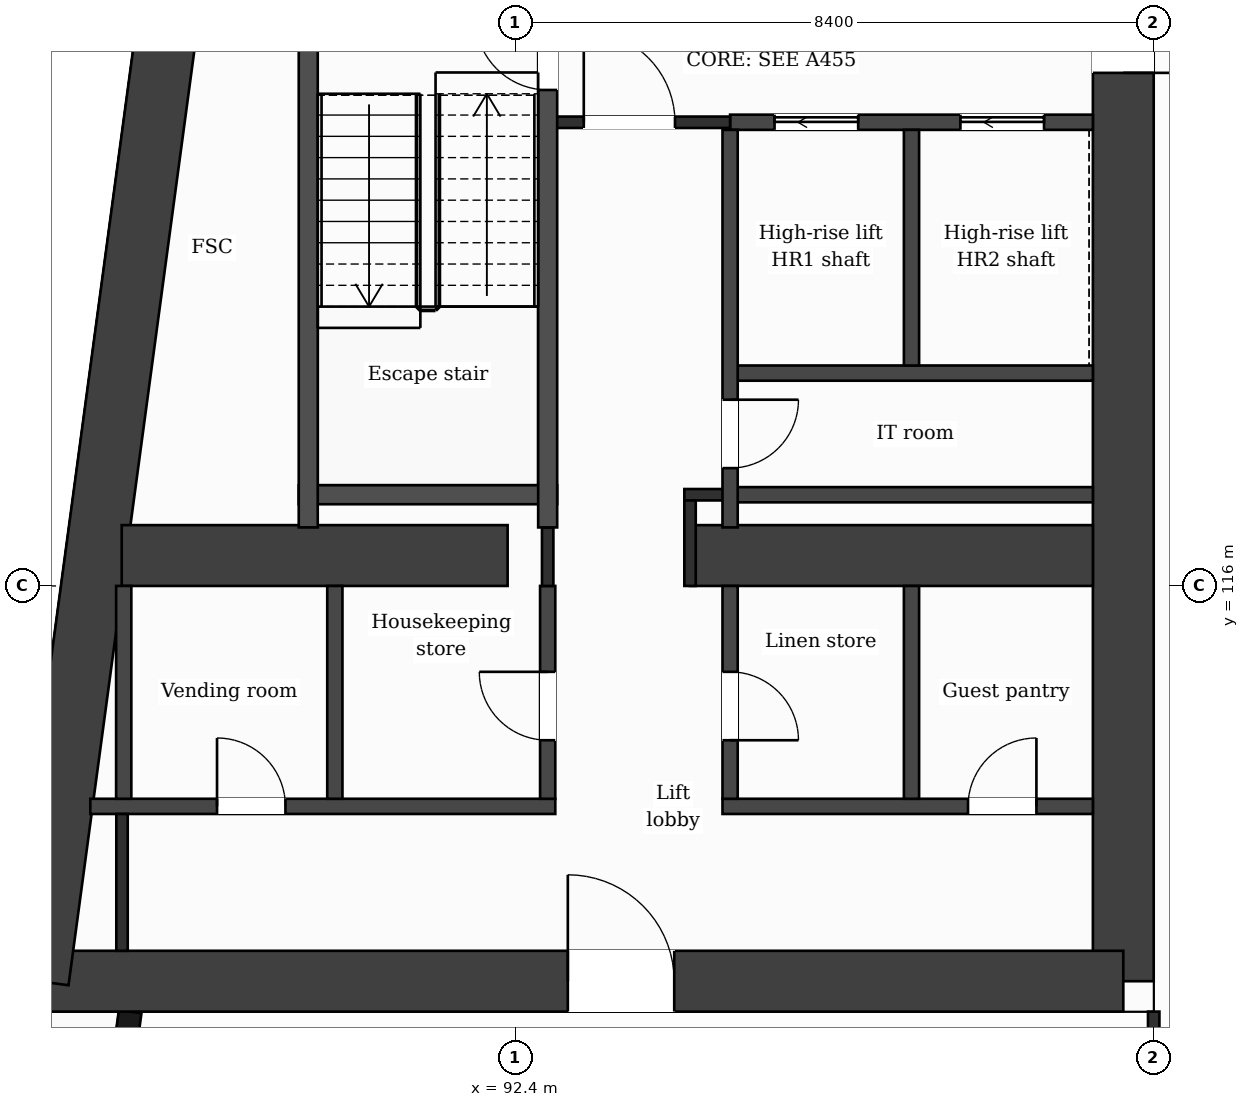
"""IFC4 building model, lengths in metres.
Left out: names, types, materials, properties, quantities, classifications, styles, units other than length and angle.
Written with IfcOpenShell. Run it as: python <this file> out.ifc"""

import sys

from ifc_helpers import new_model, si_unit, direction, frame, frame_2d, origin, place, context, subcontext, project, spatial, rectangle, extrude, element, fill, save


model = new_model("IFC4")
c1 = context("Model", 3, precision=1e-05, world=origin(), true_north=direction((0.0, 1.0)))
c2 = subcontext(c1, "Body", "Model", "MODEL_VIEW")
j1 = project(units=[si_unit("LENGTHUNIT", "METRE"), si_unit("PLANEANGLEUNIT", "RADIAN")], contexts=[c1])
p1 = place(None, origin())
s1 = spatial("IfcSite", under=j1, at=p1, CompositionType="ELEMENT")
p2 = place(p1, origin())
s2 = spatial("IfcBuilding", under=s1, at=p2, CompositionType="ELEMENT")
p3 = place(p2, frame((0.0, 0.0, 224.4)))
s3 = spatial("IfcBuildingStorey", under=s2, at=p3, CompositionType="ELEMENT", Elevation=224.4)
p4 = place(p3, frame((100.4, 132.0, 0.0), z_axis=(0.0, 0.0, 1.0), x_axis=(0.0, -1.0, 0.0)))
e1 = element("IfcWall", 1, at=p4, inside=s3, PredefinedType="SHEAR", context=c2, shape_type="SweptSolid", body=[
    extrude(rectangle(XDim=21.2, YDim=0.8, at=frame_2d((10.6, 0.0))), origin(), (0.0, 0.0, 1.0), 3.7),
])
p5 = place(p4, frame((7.85, 0.0, 0.0)))
e2 = element("IfcOpeningElement", 2, at=p5, cuts=e1, PredefinedType="OPENING", context=c2, shape_type="SweptSolid", body=[
    extrude(rectangle(XDim=1.4, YDim=2.1, at=frame_2d((0.7, 1.05))), frame((0.0, 0.41, 0.0), z_axis=(0.0, -1.0, 0.0), x_axis=(1.0, 0.0, 0.0)), (0.0, 0.0, 1.0), 0.82),
])
p6 = place(p3, frame((100.4, 110.8, 0.0), z_axis=(0.0, 0.0, 1.0), x_axis=(-1.0, 0.0, 0.0)))
e3 = element("IfcWall", 3, at=p6, inside=s3, PredefinedType="SHEAR", context=c2, shape_type="SweptSolid", body=[
    extrude(rectangle(XDim=14.273, YDim=0.8, at=frame_2d((7.137, 0.0))), origin(), (0.0, 0.0, 1.0), 3.7),
])
p7 = place(p6, frame((5.908, 0.0, 0.0)))
e4 = element("IfcOpeningElement", 4, at=p7, cuts=e3, PredefinedType="OPENING", context=c2, shape_type="SweptSolid", body=[
    extrude(rectangle(XDim=1.4, YDim=2.1, at=frame_2d((0.7, 1.05))), frame((0.0, 0.41, 0.0), z_axis=(0.0, -1.0, 0.0), x_axis=(1.0, 0.0, 0.0)), (0.0, 0.0, 1.0), 0.82),
])
p8 = place(p3, frame((86.127, 110.8, 0.0), z_axis=(0.0, 0.0, 1.0), x_axis=(0.133408347329, 0.991061154956, 0.0)))
e5 = element("IfcWall", 5, at=p8, inside=s3, PredefinedType="SHEAR", context=c2, shape_type="SweptSolid", body=[
    extrude(rectangle(XDim=21.391, YDim=0.8, at=frame_2d((10.696, 0.0))), origin(), (0.0, 0.0, 1.0), 3.7),
])
p9 = place(p3, frame((87.223, 116.4, 0.0), z_axis=(0.0, 0.0, 1.0), x_axis=(1.0, 0.0, 0.0)))
e6 = element("IfcWall", 6, at=p9, inside=s3, PredefinedType="SHEAR", context=c2, shape_type="SweptSolid", body=[
    extrude(rectangle(XDim=5.077, YDim=0.8, at=frame_2d((2.539, 0.0))), origin(), (0.0, 0.0, 1.0), 3.7),
])
p10 = place(p3, frame((94.7, 116.4, 0.0), z_axis=(0.0, 0.0, 1.0), x_axis=(1.0, 0.0, 0.0)))
e7 = element("IfcWall", 7, at=p10, inside=s3, PredefinedType="SHEAR", context=c2, shape_type="SweptSolid", body=[
    extrude(rectangle(XDim=5.3, YDim=0.8, at=frame_2d((2.65, 0.0))), origin(), (0.0, 0.0, 1.0), 3.7),
])
p11 = place(p3, frame((87.334, 110.4, 0.0), z_axis=(0.0, 0.0, 1.0), x_axis=(-0.133437175554, -0.991057273915, 0.0)))
e8 = element("IfcWall", 8, at=p11, inside=s3, PredefinedType="SOLIDWALL", context=c2, shape_type="SweptSolid", body=[
    extrude(rectangle(XDim=6.781, YDim=0.3, at=frame_2d((3.39, 0.0))), origin(), (0.0, 0.0, 1.0), 3.38),
])
p12 = place(p11, frame((1.418, 0.0, 0.0)))
e9 = element("IfcOpeningElement", 9, at=p12, cuts=e8, PredefinedType="OPENING", context=c2, shape_type="SweptSolid", body=[
    extrude(rectangle(XDim=1.2, YDim=2.4, at=frame_2d((0.6, 1.2))), frame((0.0, 0.16, 0.0), z_axis=(0.0, -1.0, 0.0), x_axis=(1.0, 0.0, 0.0)), (0.0, 0.0, 1.0), 0.32),
])
p13 = place(p11, frame((4.758, 0.0, 0.9)))
e10 = element("IfcOpeningElement", 10, at=p13, cuts=e8, PredefinedType="OPENING", context=c2, shape_type="SweptSolid", body=[
    extrude(rectangle(XDim=1.2, YDim=2.1, at=frame_2d((0.6, 1.05))), frame((0.0, 0.16, 0.0), z_axis=(0.0, -1.0, 0.0), x_axis=(1.0, 0.0, 0.0)), (0.0, 0.0, 1.0), 0.32),
])
p14 = place(p3, frame((86.81, 113.1, 0.0), z_axis=(0.0, 0.0, 1.0), x_axis=(1.0, 0.0, 0.0)))
e11 = element("IfcWall", 11, at=p14, inside=s3, PredefinedType="PARTITIONING", context=c2, shape_type="SweptSolid", body=[
    extrude(rectangle(XDim=6.117, YDim=0.2, at=frame_2d((3.059, 0.0))), origin(), (0.0, 0.0, 1.0), 3.38),
])
p15 = place(p14, frame((1.667, 0.0, 0.0)))
e12 = element("IfcOpeningElement", 12, at=p15, cuts=e11, PredefinedType="OPENING", context=c2, shape_type="SweptSolid", body=[
    extrude(rectangle(XDim=0.9, YDim=2.1, at=frame_2d((0.45, 1.05))), frame((0.0, 0.11, 0.0), z_axis=(0.0, -1.0, 0.0), x_axis=(1.0, 0.0, 0.0)), (0.0, 0.0, 1.0), 0.22),
])
p16 = place(p3, frame((95.127, 113.1, 0.0), z_axis=(0.0, 0.0, 1.0), x_axis=(1.0, 0.0, 0.0)))
e13 = element("IfcWall", 13, at=p16, inside=s3, PredefinedType="PARTITIONING", context=c2, shape_type="SweptSolid", body=[
    extrude(rectangle(XDim=4.873, YDim=0.2, at=frame_2d((2.437, 0.0))), origin(), (0.0, 0.0, 1.0), 3.38),
])
p17 = place(p16, frame((3.23, 0.0, 0.0)))
e14 = element("IfcOpeningElement", 14, at=p17, cuts=e13, PredefinedType="OPENING", context=c2, shape_type="SweptSolid", body=[
    extrude(rectangle(XDim=0.9, YDim=2.1, at=frame_2d((0.45, 1.05))), frame((0.0, 0.11, 0.0), z_axis=(0.0, -1.0, 0.0), x_axis=(1.0, 0.0, 0.0)), (0.0, 0.0, 1.0), 0.22),
])
p18 = place(p3, frame((95.227, 117.2, 0.0), z_axis=(0.0, 0.0, 1.0), x_axis=(1.0, 0.0, 0.0)))
e15 = element("IfcWall", 15, at=p18, inside=s3, PredefinedType="PARTITIONING", context=c2, shape_type="SweptSolid", body=[
    extrude(rectangle(XDim=4.773, YDim=0.2, at=frame_2d((2.386, 0.0))), origin(), (0.0, 0.0, 1.0), 3.38),
])
p19 = place(p3, frame((94.625, 117.2, 0.0), z_axis=(0.0, 0.0, 1.0), x_axis=(1.0, 0.0, 0.0)))
e16 = element("IfcWall", 16, at=p19, inside=s3, PredefinedType="PARTITIONING", context=c2, shape_type="SweptSolid", body=[
    extrude(rectangle(XDim=0.602, YDim=0.15, at=frame_2d((0.301, 0.0))), origin(), (0.0, 0.0, 1.0), 3.38),
])
p20 = place(p3, frame((89.552, 117.2, 0.0), z_axis=(0.0, 0.0, 1.0), x_axis=(1.0, 0.0, 0.0)))
e17 = element("IfcWall", 17, at=p20, inside=s3, PredefinedType="PARTITIONING", context=c2, shape_type="SweptSolid", body=[
    extrude(rectangle(XDim=3.4, YDim=0.25, at=frame_2d((1.7, 0.0))), origin(), (0.0, 0.0, 1.0), 3.38),
])
p21 = place(p3, frame((95.227, 118.8, 0.0), z_axis=(0.0, 0.0, 1.0), x_axis=(1.0, 0.0, 0.0)))
e18 = element("IfcWall", 18, at=p21, inside=s3, PredefinedType="PARTITIONING", context=c2, shape_type="SweptSolid", body=[
    extrude(rectangle(XDim=4.773, YDim=0.2, at=frame_2d((2.386, 0.0))), origin(), (0.0, 0.0, 1.0), 3.38),
])
p22 = place(p3, frame((95.227, 122.1, 0.0), z_axis=(0.0, 0.0, 1.0), x_axis=(1.0, 0.0, 0.0)))
e19 = element("IfcWall", 19, at=p22, inside=s3, PredefinedType="PARTITIONING", context=c2, shape_type="SweptSolid", body=[
    extrude(rectangle(XDim=4.773, YDim=0.2, at=frame_2d((2.386, 0.0))), origin(), (0.0, 0.0, 1.0), 3.38),
])
p23 = place(p22, frame((0.585, 0.0, 0.0)))
e20 = element("IfcOpeningElement", 20, at=p23, cuts=e19, PredefinedType="OPENING", context=c2, shape_type="SweptSolid", body=[
    extrude(rectangle(XDim=1.1, YDim=2.1, at=frame_2d((0.55, 1.05))), frame((0.0, 0.11, 0.0), z_axis=(0.0, -1.0, 0.0), x_axis=(1.0, 0.0, 0.0)), (0.0, 0.0, 1.0), 0.22),
])
p24 = place(p22, frame((3.03, 0.0, 0.0)))
e21 = element("IfcOpeningElement", 21, at=p24, cuts=e19, PredefinedType="OPENING", context=c2, shape_type="SweptSolid", body=[
    extrude(rectangle(XDim=1.1, YDim=2.1, at=frame_2d((0.55, 1.05))), frame((0.0, 0.11, 0.0), z_axis=(0.0, -1.0, 0.0), x_axis=(1.0, 0.0, 0.0)), (0.0, 0.0, 1.0), 0.22),
])
p25 = place(p3, frame((92.827, 122.1, 0.0), z_axis=(0.0, 0.0, 1.0), x_axis=(1.0, 0.0, 0.0)))
e22 = element("IfcWall", 22, at=p25, inside=s3, PredefinedType="PARTITIONING", context=c2, shape_type="SweptSolid", body=[
    extrude(rectangle(XDim=2.4, YDim=0.15, at=frame_2d((1.2, 0.0))), origin(), (0.0, 0.0, 1.0), 3.38),
])
p26 = place(p25, frame((0.475, 0.0, 0.0)))
e23 = element("IfcOpeningElement", 23, at=p26, cuts=e22, PredefinedType="OPENING", context=c2, shape_type="SweptSolid", body=[
    extrude(rectangle(XDim=1.2, YDim=2.1, at=frame_2d((0.6, 1.05))), frame((0.0, 0.085, 0.0), z_axis=(0.0, -1.0, 0.0), x_axis=(1.0, 0.0, 0.0)), (0.0, 0.0, 1.0), 0.17),
])
p27 = place(p3, frame((87.25, 113.2, 0.0), z_axis=(0.0, 0.0, 1.0), x_axis=(0.0, 1.0, 0.0)))
e24 = element("IfcWall", 24, at=p27, inside=s3, PredefinedType="PARTITIONING", context=c2, shape_type="SweptSolid", body=[
    extrude(rectangle(XDim=2.8, YDim=0.2, at=frame_2d((1.4, 0.0))), origin(), (0.0, 0.0, 1.0), 3.38),
])
p28 = place(p3, frame((87.227, 111.2, 0.0), z_axis=(0.0, 0.0, 1.0), x_axis=(0.0, 1.0, 0.0)))
e25 = element("IfcWall", 25, at=p28, inside=s3, PredefinedType="PARTITIONING", context=c2, shape_type="SweptSolid", body=[
    extrude(rectangle(XDim=1.8, YDim=0.15, at=frame_2d((0.9, 0.0))), origin(), (0.0, 0.0, 1.0), 3.38),
])
p29 = place(p3, frame((89.677, 116.77, 0.0), z_axis=(0.0, 0.0, 1.0), x_axis=(0.0, 1.0, 0.0)))
e26 = element("IfcWall", 26, at=p29, inside=s3, PredefinedType="PARTITIONING", context=c2, shape_type="SweptSolid", body=[
    extrude(rectangle(XDim=7.055, YDim=0.25, at=frame_2d((3.527, 0.0))), origin(), (0.0, 0.0, 1.0), 3.38),
])
p30 = place(p3, frame((90.027, 113.2, 0.0), z_axis=(0.0, 0.0, 1.0), x_axis=(0.0, 1.0, 0.0)))
e27 = element("IfcWall", 27, at=p30, inside=s3, PredefinedType="PARTITIONING", context=c2, shape_type="SweptSolid", body=[
    extrude(rectangle(XDim=2.8, YDim=0.2, at=frame_2d((1.4, 0.0))), origin(), (0.0, 0.0, 1.0), 3.38),
])
p31 = place(p3, frame((92.827, 113.2, 0.0), z_axis=(0.0, 0.0, 1.0), x_axis=(0.0, 1.0, 0.0)))
e28 = element("IfcWall", 28, at=p31, inside=s3, PredefinedType="PARTITIONING", context=c2, shape_type="SweptSolid", body=[
    extrude(rectangle(XDim=2.8, YDim=0.2, at=frame_2d((1.4, 0.0))), origin(), (0.0, 0.0, 1.0), 3.38),
])
p32 = place(p31, frame((0.77, 0.0, 0.0)))
e29 = element("IfcOpeningElement", 29, at=p32, cuts=e28, PredefinedType="OPENING", context=c2, shape_type="SweptSolid", body=[
    extrude(rectangle(XDim=0.9, YDim=2.1, at=frame_2d((0.45, 1.05))), frame((0.0, 0.11, 0.0), z_axis=(0.0, -1.0, 0.0), x_axis=(1.0, 0.0, 0.0)), (0.0, 0.0, 1.0), 0.22),
])
p33 = place(p3, frame((92.827, 116.0, 0.0), z_axis=(0.0, 0.0, 1.0), x_axis=(0.0, 1.0, 0.0)))
e30 = element("IfcWall", 30, at=p33, inside=s3, PredefinedType="PARTITIONING", context=c2, shape_type="SweptSolid", body=[
    extrude(rectangle(XDim=0.77, YDim=0.15, at=frame_2d((0.385, 0.0))), origin(), (0.0, 0.0, 1.0), 3.38),
])
p34 = place(p3, frame((92.827, 116.77, 0.0), z_axis=(0.0, 0.0, 1.0), x_axis=(0.0, 1.0, 0.0)))
e31 = element("IfcWall", 31, at=p34, inside=s3, PredefinedType="PARTITIONING", context=c2, shape_type="SweptSolid", body=[
    extrude(rectangle(XDim=7.055, YDim=0.25, at=frame_2d((3.527, 0.0))), origin(), (0.0, 0.0, 1.0), 3.38),
])
p35 = place(p34, frame((5.755, 0.0, 0.0)))
e32 = element("IfcOpeningElement", 32, at=p35, cuts=e31, PredefinedType="OPENING", context=c2, shape_type="SweptSolid", body=[
    extrude(rectangle(XDim=0.95, YDim=2.1, at=frame_2d((0.475, 1.05))), frame((0.0, 0.135, 0.0), z_axis=(0.0, -1.0, 0.0), x_axis=(1.0, 0.0, 0.0)), (0.0, 0.0, 1.0), 0.27),
])
p36 = place(p3, frame((94.7, 116.0, 0.0), z_axis=(0.0, 0.0, 1.0), x_axis=(0.0, 1.0, 0.0)))
e33 = element("IfcWall", 33, at=p36, inside=s3, PredefinedType="PARTITIONING", context=c2, shape_type="SweptSolid", body=[
    extrude(rectangle(XDim=1.125, YDim=0.15, at=frame_2d((0.562, 0.0))), origin(), (0.0, 0.0, 1.0), 3.38),
])
p37 = place(p3, frame((95.227, 113.2, 0.0), z_axis=(0.0, 0.0, 1.0), x_axis=(0.0, 1.0, 0.0)))
e34 = element("IfcWall", 34, at=p37, inside=s3, PredefinedType="PARTITIONING", context=c2, shape_type="SweptSolid", body=[
    extrude(rectangle(XDim=2.8, YDim=0.2, at=frame_2d((1.4, 0.0))), origin(), (0.0, 0.0, 1.0), 3.38),
])
p38 = place(p37, frame((0.77, 0.0, 0.0)))
e35 = element("IfcOpeningElement", 35, at=p38, cuts=e34, PredefinedType="OPENING", context=c2, shape_type="SweptSolid", body=[
    extrude(rectangle(XDim=0.9, YDim=2.1, at=frame_2d((0.45, 1.05))), frame((0.0, 0.11, 0.0), z_axis=(0.0, -1.0, 0.0), x_axis=(1.0, 0.0, 0.0)), (0.0, 0.0, 1.0), 0.22),
])
p39 = place(p3, frame((95.227, 116.77, 0.0), z_axis=(0.0, 0.0, 1.0), x_axis=(0.0, 1.0, 0.0)))
e36 = element("IfcWall", 36, at=p39, inside=s3, PredefinedType="PARTITIONING", context=c2, shape_type="SweptSolid", body=[
    extrude(rectangle(XDim=5.23, YDim=0.2, at=frame_2d((2.615, 0.0))), origin(), (0.0, 0.0, 1.0), 3.38),
])
p40 = place(p39, frame((0.78, 0.0, 0.0)))
e37 = element("IfcOpeningElement", 37, at=p40, cuts=e36, PredefinedType="OPENING", context=c2, shape_type="SweptSolid", body=[
    extrude(rectangle(XDim=0.9, YDim=2.1, at=frame_2d((0.45, 1.05))), frame((0.0, 0.11, 0.0), z_axis=(0.0, -1.0, 0.0), x_axis=(1.0, 0.0, 0.0)), (0.0, 0.0, 1.0), 0.22),
])
p41 = place(p3, frame((97.614, 113.2, 0.0), z_axis=(0.0, 0.0, 1.0), x_axis=(0.0, 1.0, 0.0)))
e38 = element("IfcWall", 38, at=p41, inside=s3, PredefinedType="PARTITIONING", context=c2, shape_type="SweptSolid", body=[
    extrude(rectangle(XDim=2.8, YDim=0.2, at=frame_2d((1.4, 0.0))), origin(), (0.0, 0.0, 1.0), 3.38),
])
p42 = place(p3, frame((97.614, 118.9, 0.0), z_axis=(0.0, 0.0, 1.0), x_axis=(0.0, 1.0, 0.0)))
e39 = element("IfcWall", 39, at=p42, inside=s3, PredefinedType="PARTITIONING", context=c2, shape_type="SweptSolid", body=[
    extrude(rectangle(XDim=3.1, YDim=0.2, at=frame_2d((1.55, 0.0))), origin(), (0.0, 0.0, 1.0), 3.38),
])
p43 = place(p3, frame((100.8, 109.075, 0.0), z_axis=(0.0, 0.0, 1.0), x_axis=(0.0, 1.0, 0.0)))
e40 = element("IfcWall", 40, at=p43, inside=s3, PredefinedType="PARTITIONING", context=c2, shape_type="SweptSolid", body=[
    extrude(rectangle(XDim=1.325, YDim=0.15, at=frame_2d((0.663, 0.0))), origin(), (0.0, 0.0, 1.0), 3.38),
])
p44 = place(p26, origin())
e41 = element("IfcDoor", 41, at=p44, inside=s3, OperationType="SINGLE_SWING_LEFT", PredefinedType="DOOR", context=c2, shape_type="SweptSolid", body=[
    extrude(rectangle(XDim=1.2, YDim=2.1, at=frame_2d((0.6, 1.05))), frame((0.0, 0.025, 0.0), z_axis=(0.0, -1.0, 0.0), x_axis=(1.0, 0.0, 0.0)), (0.0, 0.0, 1.0), 0.05),
])
fill(e23, e41)
p45 = place(p23, origin())
e42 = element("IfcDoor", 42, at=p45, inside=s3, OperationType="SLIDING_TO_LEFT", PredefinedType="DOOR", context=c2, shape_type="SweptSolid", body=[
    extrude(rectangle(XDim=1.1, YDim=2.1, at=frame_2d((0.55, 1.05))), frame((0.0, 0.025, 0.0), z_axis=(0.0, -1.0, 0.0), x_axis=(1.0, 0.0, 0.0)), (0.0, 0.0, 1.0), 0.05),
])
fill(e20, e42)
p46 = place(p24, origin())
e43 = element("IfcDoor", 43, at=p46, inside=s3, OperationType="SLIDING_TO_LEFT", PredefinedType="DOOR", context=c2, shape_type="SweptSolid", body=[
    extrude(rectangle(XDim=1.1, YDim=2.1, at=frame_2d((0.55, 1.05))), frame((0.0, 0.025, 0.0), z_axis=(0.0, -1.0, 0.0), x_axis=(1.0, 0.0, 0.0)), (0.0, 0.0, 1.0), 0.05),
])
fill(e21, e43)
p47 = place(p35, origin())
e44 = element("IfcDoor", 44, at=p47, inside=s3, OperationType="SINGLE_SWING_RIGHT", PredefinedType="DOOR", context=c2, shape_type="SweptSolid", body=[
    extrude(rectangle(XDim=0.95, YDim=2.1, at=frame_2d((0.475, 1.05))), frame((0.0, 0.025, 0.0), z_axis=(0.0, -1.0, 0.0), x_axis=(1.0, 0.0, 0.0)), (0.0, 0.0, 1.0), 0.05),
])
fill(e32, e44)
p48 = place(p40, origin())
e45 = element("IfcDoor", 45, at=p48, inside=s3, OperationType="SINGLE_SWING_RIGHT", PredefinedType="DOOR", context=c2, shape_type="SweptSolid", body=[
    extrude(rectangle(XDim=0.9, YDim=2.1, at=frame_2d((0.45, 1.05))), frame((0.0, 0.025, 0.0), z_axis=(0.0, -1.0, 0.0), x_axis=(1.0, 0.0, 0.0)), (0.0, 0.0, 1.0), 0.05),
])
fill(e37, e45)
p49 = place(p15, origin())
e46 = element("IfcDoor", 46, at=p49, inside=s3, OperationType="SINGLE_SWING_LEFT", PredefinedType="DOOR", context=c2, shape_type="SweptSolid", body=[
    extrude(rectangle(XDim=0.9, YDim=2.1, at=frame_2d((0.45, 1.05))), frame((0.0, 0.025, 0.0), z_axis=(0.0, -1.0, 0.0), x_axis=(1.0, 0.0, 0.0)), (0.0, 0.0, 1.0), 0.05),
])
fill(e12, e46)
p50 = place(p32, origin())
e47 = element("IfcDoor", 47, at=p50, inside=s3, OperationType="SINGLE_SWING_RIGHT", PredefinedType="DOOR", context=c2, shape_type="SweptSolid", body=[
    extrude(rectangle(XDim=0.9, YDim=2.1, at=frame_2d((0.45, 1.05))), frame((0.0, 0.025, 0.0), z_axis=(0.0, -1.0, 0.0), x_axis=(1.0, 0.0, 0.0)), (0.0, 0.0, 1.0), 0.05),
])
fill(e29, e47)
p51 = place(p38, origin())
e48 = element("IfcDoor", 48, at=p51, inside=s3, OperationType="SINGLE_SWING_LEFT", PredefinedType="DOOR", context=c2, shape_type="SweptSolid", body=[
    extrude(rectangle(XDim=0.9, YDim=2.1, at=frame_2d((0.45, 1.05))), frame((0.0, 0.025, 0.0), z_axis=(0.0, -1.0, 0.0), x_axis=(1.0, 0.0, 0.0)), (0.0, 0.0, 1.0), 0.05),
])
fill(e35, e48)
p52 = place(p17, origin())
e49 = element("IfcDoor", 49, at=p52, inside=s3, OperationType="SINGLE_SWING_RIGHT", PredefinedType="DOOR", context=c2, shape_type="SweptSolid", body=[
    extrude(rectangle(XDim=0.9, YDim=2.1, at=frame_2d((0.45, 1.05))), frame((0.0, 0.025, 0.0), z_axis=(0.0, -1.0, 0.0), x_axis=(1.0, 0.0, 0.0)), (0.0, 0.0, 1.0), 0.05),
])
fill(e14, e49)
p53 = place(p7, origin())
e50 = element("IfcDoor", 50, at=p53, inside=s3, OperationType="SINGLE_SWING_RIGHT", PredefinedType="DOOR", context=c2, shape_type="SweptSolid", body=[
    extrude(rectangle(XDim=1.4, YDim=2.1, at=frame_2d((0.7, 1.05))), frame((0.0, 0.025, 0.0), z_axis=(0.0, -1.0, 0.0), x_axis=(1.0, 0.0, 0.0)), (0.0, 0.0, 1.0), 0.05),
])
fill(e4, e50)
p54 = place(p5, origin())
e51 = element("IfcDoor", 51, at=p54, inside=s3, OperationType="SINGLE_SWING_RIGHT", PredefinedType="DOOR", context=c2, shape_type="SweptSolid", body=[
    extrude(rectangle(XDim=1.4, YDim=2.1, at=frame_2d((0.7, 1.05))), frame((0.0, 0.025, 0.0), z_axis=(0.0, -1.0, 0.0), x_axis=(1.0, 0.0, 0.0)), (0.0, 0.0, 1.0), 0.05),
])
fill(e2, e51)
save(model, sys.argv[1])
